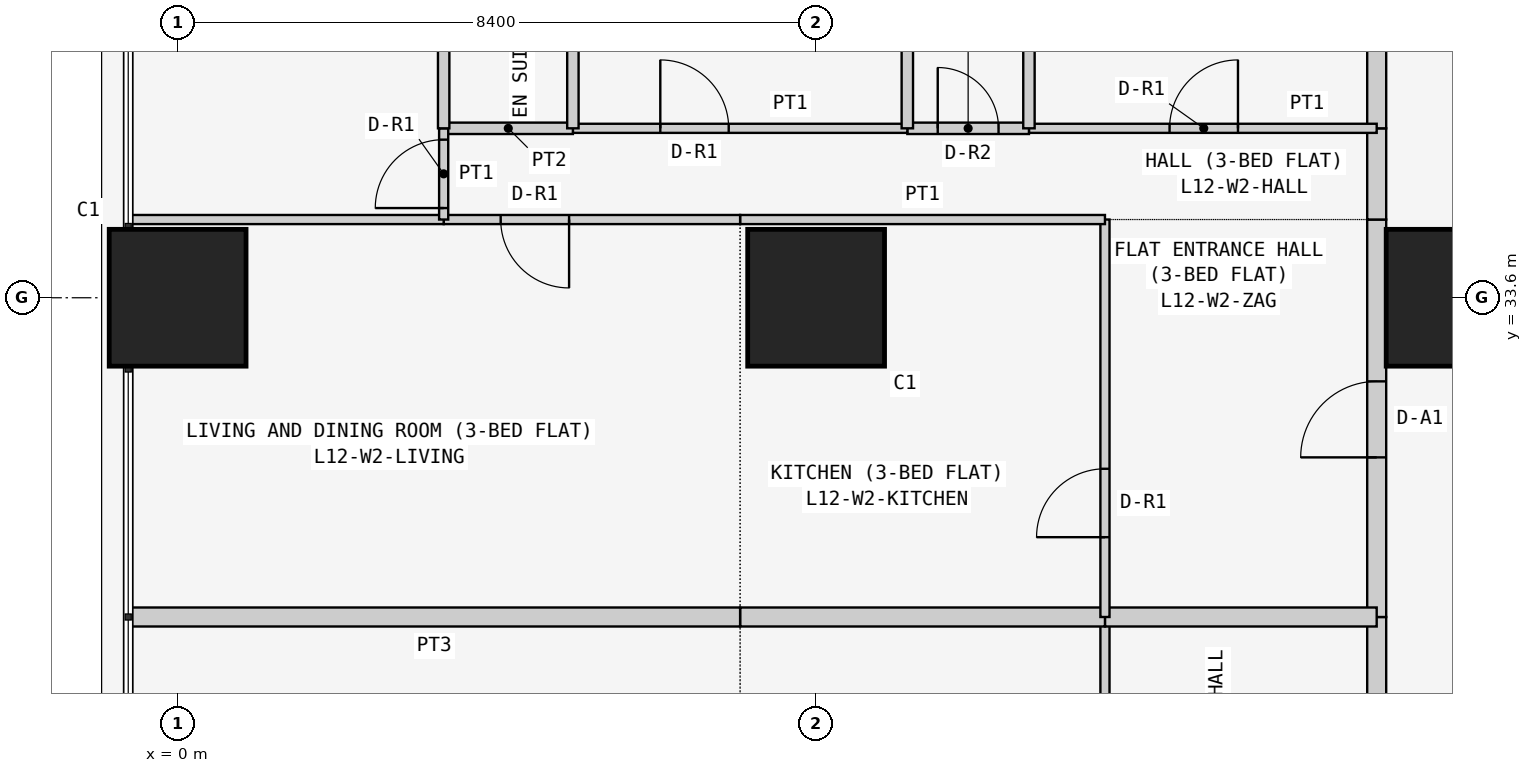
"""IFC4 building model, lengths in metres.
Left out: names, types, materials, properties, quantities, classifications, styles, units other than length and angle.
Written with IfcOpenShell. Run it as: python <this file> out.ifc"""

import sys

from ifc_helpers import new_model, si_unit, direction, frame, frame_2d, origin, origin_2d, place, context, subcontext, project, spatial, rectangle, extrude, element, fill, save


model = new_model("IFC4")
c1 = context("Model", 3, precision=1e-05, world=origin(), true_north=direction((0.0, 1.0)))
c2 = subcontext(c1, "Body", "Model", "MODEL_VIEW")
j1 = project(units=[si_unit("LENGTHUNIT", "METRE"), si_unit("PLANEANGLEUNIT", "RADIAN")], contexts=[c1])
p1 = place(None, origin())
s1 = spatial("IfcSite", under=j1, at=p1, CompositionType="ELEMENT")
p2 = place(p1, origin())
s2 = spatial("IfcBuilding", under=s1, at=p2, CompositionType="ELEMENT")
p3 = place(p2, frame((0.0, 0.0, 52.5)))
s3 = spatial("IfcBuildingStorey", under=s2, at=p3, CompositionType="ELEMENT", Elevation=52.5)
for number, where, z_axis, x_axis in (
    (1, (0.0, 33.6, 0.0), (0.0, 0.0, 1.0), (1.0, 0.0, 0.0)),
    (2, (8.4, 33.6, 0.0), (0.0, 0.0, 1.0), (1.0, 0.0, 0.0)),
    (3, (16.8, 33.6, 0.0), (0.0, 0.0, 1.0), (1.0, 0.0, 0.0)),
):
    element("IfcColumn", number, at=place(p3, frame(where, z_axis=z_axis, x_axis=x_axis)), inside=s3, PredefinedType="COLUMN", context=c2, shape_type="SweptSolid", body=[
        extrude(rectangle(XDim=1.8, YDim=1.8, at=origin_2d()), origin(), (0.0, 0.0, 1.0), 3.6),
    ])
p4 = place(p3, frame((15.775, 24.171, 0.0), z_axis=(0.0, 0.0, 1.0), x_axis=(0.0, 1.0, 0.0)))
e4 = element("IfcWall", 4, at=p4, inside=s3, PredefinedType="PARTITIONING", context=c2, shape_type="SweptSolid", body=[
    extrude(rectangle(XDim=5.229, YDim=0.25, at=frame_2d((2.615, 0.0))), origin(), (0.0, 0.0, 1.0), 3.45),
])
p5 = place(p4, frame((2.129, 0.0, 0.0)))
e5 = element("IfcOpeningElement", 5, at=p5, cuts=e4, PredefinedType="OPENING", context=c2, shape_type="SweptSolid", body=[
    extrude(rectangle(XDim=1.0, YDim=2.1, at=frame_2d((0.5, 1.05))), frame((0.0, 0.135, 0.0), z_axis=(0.0, -1.0, 0.0), x_axis=(1.0, 0.0, 0.0)), (0.0, 0.0, 1.0), 0.27),
])
p6 = place(p3, frame((15.775, 29.4, 0.0), z_axis=(0.0, 0.0, 1.0), x_axis=(0.0, 1.0, 0.0)))
e6 = element("IfcWall", 6, at=p6, inside=s3, PredefinedType="PARTITIONING", context=c2, shape_type="SweptSolid", body=[
    extrude(rectangle(XDim=5.229, YDim=0.25, at=frame_2d((2.615, 0.0))), origin(), (0.0, 0.0, 1.0), 3.45),
])
p7 = place(p6, frame((2.1, 0.0, 0.0)))
e7 = element("IfcOpeningElement", 7, at=p7, cuts=e6, PredefinedType="OPENING", context=c2, shape_type="SweptSolid", body=[
    extrude(rectangle(XDim=1.0, YDim=2.1, at=frame_2d((0.5, 1.05))), frame((0.0, 0.135, 0.0), z_axis=(0.0, -1.0, 0.0), x_axis=(1.0, 0.0, 0.0)), (0.0, 0.0, 1.0), 0.27),
])
p8 = place(p3, frame((15.775, 34.629, 0.0), z_axis=(0.0, 0.0, 1.0), x_axis=(0.0, 1.0, 0.0)))
e8 = element("IfcWall", 8, at=p8, inside=s3, PredefinedType="PARTITIONING", context=c2, shape_type="SweptSolid", body=[
    extrude(rectangle(XDim=1.2, YDim=0.25, at=frame_2d((0.6, 0.0))), origin(), (0.0, 0.0, 1.0), 3.45),
])
p9 = place(p3, frame((15.775, 35.829, 0.0), z_axis=(0.0, 0.0, 1.0), x_axis=(0.0, 1.0, 0.0)))
e9 = element("IfcWall", 9, at=p9, inside=s3, PredefinedType="PARTITIONING", context=c2, shape_type="SweptSolid", body=[
    extrude(rectangle(XDim=6.871, YDim=0.25, at=frame_2d((3.436, 0.0))), origin(), (0.0, 0.0, 1.0), 3.45),
])
p10 = place(p3, frame((12.2, 29.4, 0.0), z_axis=(0.0, 0.0, 1.0), x_axis=(0.0, -1.0, 0.0)))
e10 = element("IfcWall", 10, at=p10, inside=s3, PredefinedType="PARTITIONING", context=c2, shape_type="SweptSolid", body=[
    extrude(rectangle(XDim=5.229, YDim=0.12, at=frame_2d((2.615, 0.0))), origin(), (0.0, 0.0, 1.0), 3.45),
])
p11 = place(p10, frame((1.05, 0.0, 0.0)))
e11 = element("IfcOpeningElement", 11, at=p11, cuts=e10, PredefinedType="OPENING", context=c2, shape_type="SweptSolid", body=[
    extrude(rectangle(XDim=0.9, YDim=2.1, at=frame_2d((0.45, 1.05))), frame((0.0, 0.07, 0.0), z_axis=(0.0, -1.0, 0.0), x_axis=(1.0, 0.0, 0.0)), (0.0, 0.0, 1.0), 0.14),
])
p12 = place(p3, frame((15.775, 29.4, 0.0), z_axis=(0.0, 0.0, 1.0), x_axis=(-1.0, 0.0, 0.0)))
e12 = element("IfcWall", 12, at=p12, inside=s3, PredefinedType="PARTITIONING", context=c2, shape_type="SweptSolid", body=[
    extrude(rectangle(XDim=3.575, YDim=0.25, at=frame_2d((1.788, 0.0))), origin(), (0.0, 0.0, 1.0), 3.45),
])
p13 = place(p3, frame((12.2, 29.4, 0.0), z_axis=(0.0, 0.0, 1.0), x_axis=(-1.0, 0.0, 0.0)))
e13 = element("IfcWall", 13, at=p13, inside=s3, PredefinedType="PARTITIONING", context=c2, shape_type="SweptSolid", body=[
    extrude(rectangle(XDim=4.8, YDim=0.25, at=frame_2d((2.4, 0.0))), origin(), (0.0, 0.0, 1.0), 3.45),
])
p14 = place(p3, frame((7.4, 29.4, 0.0), z_axis=(0.0, 0.0, 1.0), x_axis=(-1.0, 0.0, 0.0)))
e14 = element("IfcWall", 14, at=p14, inside=s3, PredefinedType="PARTITIONING", context=c2, shape_type="SweptSolid", body=[
    extrude(rectangle(XDim=8.05, YDim=0.25, at=frame_2d((4.025, 0.0))), origin(), (0.0, 0.0, 1.0), 3.45),
])
p15 = place(p3, frame((12.2, 29.4, 0.0), z_axis=(0.0, 0.0, 1.0), x_axis=(0.0, 1.0, 0.0)))
e15 = element("IfcWall", 15, at=p15, inside=s3, PredefinedType="PARTITIONING", context=c2, shape_type="SweptSolid", body=[
    extrude(rectangle(XDim=5.229, YDim=0.12, at=frame_2d((2.615, 0.0))), origin(), (0.0, 0.0, 1.0), 3.45),
])
p16 = place(p15, frame((1.05, 0.0, 0.0)))
e16 = element("IfcOpeningElement", 16, at=p16, cuts=e15, PredefinedType="OPENING", context=c2, shape_type="SweptSolid", body=[
    extrude(rectangle(XDim=0.9, YDim=2.1, at=frame_2d((0.45, 1.05))), frame((0.0, 0.07, 0.0), z_axis=(0.0, -1.0, 0.0), x_axis=(1.0, 0.0, 0.0)), (0.0, 0.0, 1.0), 0.14),
])
p17 = place(p3, frame((7.4, 34.629, 0.0), z_axis=(0.0, 0.0, 1.0), x_axis=(1.0, 0.0, 0.0)))
e17 = element("IfcWall", 17, at=p17, inside=s3, PredefinedType="PARTITIONING", context=c2, shape_type="SweptSolid", body=[
    extrude(rectangle(XDim=4.8, YDim=0.12, at=frame_2d((2.4, 0.0))), origin(), (0.0, 0.0, 1.0), 3.45),
])
p18 = place(p3, frame((3.5, 34.629, 0.0), z_axis=(0.0, 0.0, 1.0), x_axis=(1.0, 0.0, 0.0)))
e18 = element("IfcWall", 18, at=p18, inside=s3, PredefinedType="PARTITIONING", context=c2, shape_type="SweptSolid", body=[
    extrude(rectangle(XDim=3.9, YDim=0.12, at=frame_2d((1.95, 0.0))), origin(), (0.0, 0.0, 1.0), 3.45),
])
p19 = place(p18, frame((0.75, 0.0, 0.0)))
e19 = element("IfcOpeningElement", 19, at=p19, cuts=e18, PredefinedType="OPENING", context=c2, shape_type="SweptSolid", body=[
    extrude(rectangle(XDim=0.9, YDim=2.1, at=frame_2d((0.45, 1.05))), frame((0.0, 0.07, 0.0), z_axis=(0.0, -1.0, 0.0), x_axis=(1.0, 0.0, 0.0)), (0.0, 0.0, 1.0), 0.14),
])
p20 = place(p3, frame((-0.65, 34.629, 0.0), z_axis=(0.0, 0.0, 1.0), x_axis=(1.0, 0.0, 0.0)))
e20 = element("IfcWall", 20, at=p20, inside=s3, PredefinedType="PARTITIONING", context=c2, shape_type="SweptSolid", body=[
    extrude(rectangle(XDim=4.15, YDim=0.12, at=frame_2d((2.075, 0.0))), origin(), (0.0, 0.0, 1.0), 3.45),
])
p21 = place(p3, frame((11.2, 35.829, 0.0), z_axis=(0.0, 0.0, 1.0), x_axis=(1.0, 0.0, 0.0)))
e21 = element("IfcWall", 21, at=p21, inside=s3, PredefinedType="PARTITIONING", context=c2, shape_type="SweptSolid", body=[
    extrude(rectangle(XDim=4.575, YDim=0.12, at=frame_2d((2.288, 0.0))), origin(), (0.0, 0.0, 1.0), 3.45),
])
p22 = place(p21, frame((1.85, 0.0, 0.0)))
e22 = element("IfcOpeningElement", 22, at=p22, cuts=e21, PredefinedType="OPENING", context=c2, shape_type="SweptSolid", body=[
    extrude(rectangle(XDim=0.9, YDim=2.1, at=frame_2d((0.45, 1.05))), frame((0.0, 0.07, 0.0), z_axis=(0.0, -1.0, 0.0), x_axis=(1.0, 0.0, 0.0)), (0.0, 0.0, 1.0), 0.14),
])
p23 = place(p3, frame((9.6, 35.829, 0.0), z_axis=(0.0, 0.0, 1.0), x_axis=(1.0, 0.0, 0.0)))
e23 = element("IfcWall", 23, at=p23, inside=s3, PredefinedType="PARTITIONING", context=c2, shape_type="SweptSolid", body=[
    extrude(rectangle(XDim=1.6, YDim=0.15, at=frame_2d((0.8, 0.0))), origin(), (0.0, 0.0, 1.0), 3.45),
])
p24 = place(p23, frame((0.4, 0.0, 0.0)))
e24 = element("IfcOpeningElement", 24, at=p24, cuts=e23, PredefinedType="OPENING", context=c2, shape_type="SweptSolid", body=[
    extrude(rectangle(XDim=0.8, YDim=2.1, at=frame_2d((0.4, 1.05))), frame((0.0, 0.085, 0.0), z_axis=(0.0, -1.0, 0.0), x_axis=(1.0, 0.0, 0.0)), (0.0, 0.0, 1.0), 0.17),
])
p25 = place(p3, frame((5.2, 35.829, 0.0), z_axis=(0.0, 0.0, 1.0), x_axis=(1.0, 0.0, 0.0)))
e25 = element("IfcWall", 25, at=p25, inside=s3, PredefinedType="PARTITIONING", context=c2, shape_type="SweptSolid", body=[
    extrude(rectangle(XDim=4.4, YDim=0.12, at=frame_2d((2.2, 0.0))), origin(), (0.0, 0.0, 1.0), 3.45),
])
p26 = place(p25, frame((1.15, 0.0, 0.0)))
e26 = element("IfcOpeningElement", 26, at=p26, cuts=e25, PredefinedType="OPENING", context=c2, shape_type="SweptSolid", body=[
    extrude(rectangle(XDim=0.9, YDim=2.1, at=frame_2d((0.45, 1.05))), frame((0.0, 0.07, 0.0), z_axis=(0.0, -1.0, 0.0), x_axis=(1.0, 0.0, 0.0)), (0.0, 0.0, 1.0), 0.14),
])
p27 = place(p3, frame((3.5, 35.829, 0.0), z_axis=(0.0, 0.0, 1.0), x_axis=(1.0, 0.0, 0.0)))
e27 = element("IfcWall", 27, at=p27, inside=s3, PredefinedType="PARTITIONING", context=c2, shape_type="SweptSolid", body=[
    extrude(rectangle(XDim=1.7, YDim=0.15, at=frame_2d((0.85, 0.0))), origin(), (0.0, 0.0, 1.0), 3.45),
])
p28 = place(p3, frame((3.5, 34.629, 0.0), z_axis=(0.0, 0.0, 1.0), x_axis=(0.0, 1.0, 0.0)))
e28 = element("IfcWall", 28, at=p28, inside=s3, PredefinedType="PARTITIONING", context=c2, shape_type="SweptSolid", body=[
    extrude(rectangle(XDim=1.2, YDim=0.12, at=frame_2d((0.6, 0.0))), origin(), (0.0, 0.0, 1.0), 3.45),
])
p29 = place(p28, frame((0.151, 0.0, 0.0)))
e29 = element("IfcOpeningElement", 29, at=p29, cuts=e28, PredefinedType="OPENING", context=c2, shape_type="SweptSolid", body=[
    extrude(rectangle(XDim=0.9, YDim=2.1, at=frame_2d((0.45, 1.05))), frame((0.0, 0.07, 0.0), z_axis=(0.0, -1.0, 0.0), x_axis=(1.0, 0.0, 0.0)), (0.0, 0.0, 1.0), 0.14),
])
for number, where, z_axis, x_axis in (
    (30, (11.2, 35.829, 0.0), (0.0, 0.0, 1.0), (0.0, 1.0, 0.0)),
    (31, (9.6, 35.829, 0.0), (0.0, 0.0, 1.0), (0.0, 1.0, 0.0)),
    (32, (5.2, 35.829, 0.0), (0.0, 0.0, 1.0), (0.0, 1.0, 0.0)),
):
    element("IfcWall", number, at=place(p3, frame(where, z_axis=z_axis, x_axis=x_axis)), inside=s3, PredefinedType="PARTITIONING", context=c2, shape_type="SweptSolid", body=[
        extrude(rectangle(XDim=6.871, YDim=0.15, at=frame_2d((3.436, 0.0))), origin(), (0.0, 0.0, 1.0), 3.45),
    ])
p30 = place(p3, frame((3.5, 35.829, 0.0), z_axis=(0.0, 0.0, 1.0), x_axis=(0.0, 1.0, 0.0)))
e33 = element("IfcWall", 33, at=p30, inside=s3, PredefinedType="PARTITIONING", context=c2, shape_type="SweptSolid", body=[
    extrude(rectangle(XDim=6.871, YDim=0.15, at=frame_2d((3.436, 0.0))), origin(), (0.0, 0.0, 1.0), 3.45),
])
p31 = place(p30, frame((3.171, 0.0, 0.0)))
e34 = element("IfcOpeningElement", 34, at=p31, cuts=e33, PredefinedType="OPENING", context=c2, shape_type="SweptSolid", body=[
    extrude(rectangle(XDim=0.8, YDim=2.1, at=frame_2d((0.4, 1.05))), frame((0.0, 0.085, 0.0), z_axis=(0.0, -1.0, 0.0), x_axis=(1.0, 0.0, 0.0)), (0.0, 0.0, 1.0), 0.17),
])
p32 = place(p7, origin())
e35 = element("IfcDoor", 35, at=p32, inside=s3, OperationType="SINGLE_SWING_LEFT", PredefinedType="DOOR", context=c2, shape_type="SweptSolid", body=[
    extrude(rectangle(XDim=1.0, YDim=2.1, at=frame_2d((0.5, 1.05))), frame((0.0, 0.025, 0.0), z_axis=(0.0, -1.0, 0.0), x_axis=(1.0, 0.0, 0.0)), (0.0, 0.0, 1.0), 0.05),
])
fill(e7, e35)
p33 = place(p16, origin())
e36 = element("IfcDoor", 36, at=p33, inside=s3, OperationType="SINGLE_SWING_LEFT", PredefinedType="DOOR", context=c2, shape_type="SweptSolid", body=[
    extrude(rectangle(XDim=0.9, YDim=2.1, at=frame_2d((0.45, 1.05))), frame((0.0, 0.025, 0.0), z_axis=(0.0, -1.0, 0.0), x_axis=(1.0, 0.0, 0.0)), (0.0, 0.0, 1.0), 0.05),
])
fill(e16, e36)
p34 = place(p19, frame((0.9, 0.0, 0.0), z_axis=(0.0, 0.0, 1.0), x_axis=(-1.0, 0.0, 0.0)))
e37 = element("IfcDoor", 37, at=p34, inside=s3, OperationType="SINGLE_SWING_LEFT", PredefinedType="DOOR", context=c2, shape_type="SweptSolid", body=[
    extrude(rectangle(XDim=0.9, YDim=2.1, at=frame_2d((0.45, 1.05))), frame((0.0, 0.025, 0.0), z_axis=(0.0, -1.0, 0.0), x_axis=(1.0, 0.0, 0.0)), (0.0, 0.0, 1.0), 0.05),
])
fill(e19, e37)
p35 = place(p22, origin())
e38 = element("IfcDoor", 38, at=p35, inside=s3, OperationType="SINGLE_SWING_RIGHT", PredefinedType="DOOR", context=c2, shape_type="SweptSolid", body=[
    extrude(rectangle(XDim=0.9, YDim=2.1, at=frame_2d((0.45, 1.05))), frame((0.0, 0.025, 0.0), z_axis=(0.0, -1.0, 0.0), x_axis=(1.0, 0.0, 0.0)), (0.0, 0.0, 1.0), 0.05),
])
fill(e22, e38)
p36 = place(p24, origin())
e39 = element("IfcDoor", 39, at=p36, inside=s3, OperationType="SINGLE_SWING_LEFT", PredefinedType="DOOR", context=c2, shape_type="SweptSolid", body=[
    extrude(rectangle(XDim=0.8, YDim=2.1, at=frame_2d((0.4, 1.05))), frame((0.0, 0.025, 0.0), z_axis=(0.0, -1.0, 0.0), x_axis=(1.0, 0.0, 0.0)), (0.0, 0.0, 1.0), 0.05),
])
fill(e24, e39)
p37 = place(p26, origin())
e40 = element("IfcDoor", 40, at=p37, inside=s3, OperationType="SINGLE_SWING_LEFT", PredefinedType="DOOR", context=c2, shape_type="SweptSolid", body=[
    extrude(rectangle(XDim=0.9, YDim=2.1, at=frame_2d((0.45, 1.05))), frame((0.0, 0.025, 0.0), z_axis=(0.0, -1.0, 0.0), x_axis=(1.0, 0.0, 0.0)), (0.0, 0.0, 1.0), 0.05),
])
fill(e26, e40)
p38 = place(p29, origin())
e41 = element("IfcDoor", 41, at=p38, inside=s3, OperationType="SINGLE_SWING_LEFT", PredefinedType="DOOR", context=c2, shape_type="SweptSolid", body=[
    extrude(rectangle(XDim=0.9, YDim=2.1, at=frame_2d((0.45, 1.05))), frame((0.0, 0.025, 0.0), z_axis=(0.0, -1.0, 0.0), x_axis=(1.0, 0.0, 0.0)), (0.0, 0.0, 1.0), 0.05),
])
fill(e29, e41)
save(model, sys.argv[1])
